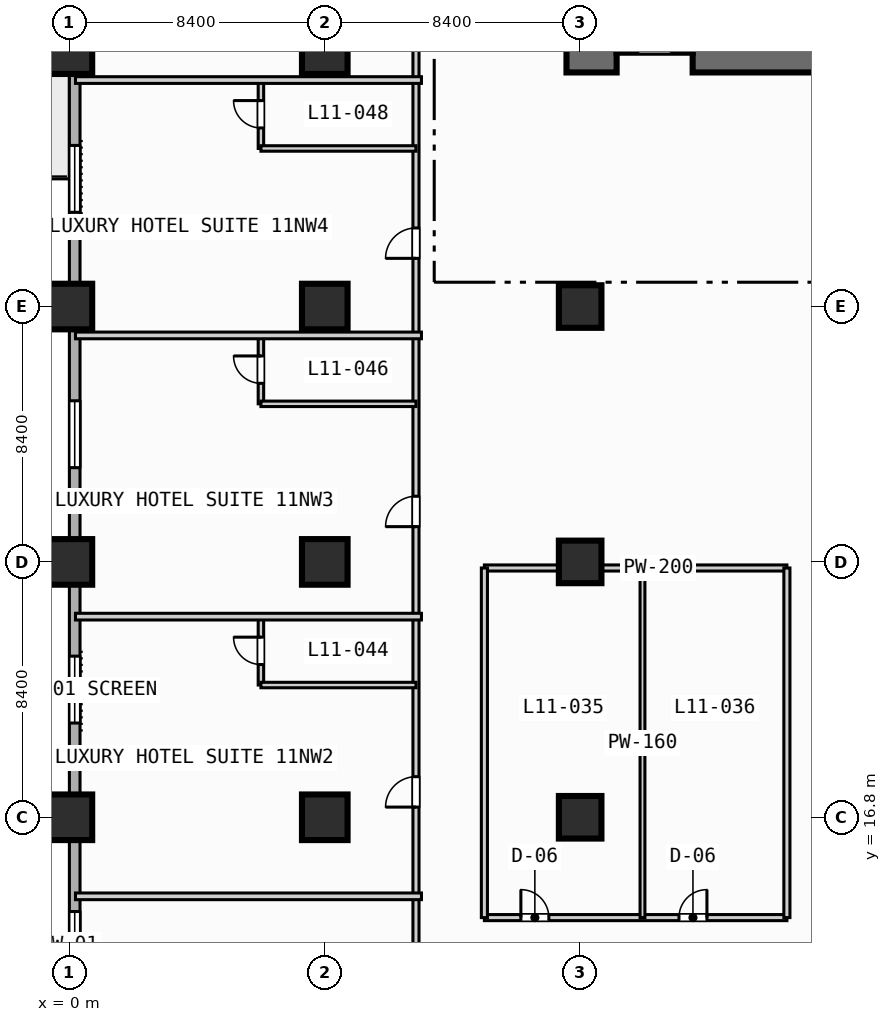
"""IFC4 building model, lengths in metres.
Left out: names, types, materials, properties, quantities, classifications, styles, units other than length and angle.
Written with IfcOpenShell. Run it as: python <this file> out.ifc"""

import sys

from ifc_helpers import new_model, si_unit, direction, frame, frame_2d, origin, origin_2d, place, context, subcontext, project, spatial, rectangle, extrude, element, fill, save


model = new_model("IFC4")
c1 = context("Model", 3, precision=1e-05, world=origin(), true_north=direction((0.0, 1.0)))
c2 = subcontext(c1, "Body", "Model", "MODEL_VIEW")
j1 = project(units=[si_unit("LENGTHUNIT", "METRE"), si_unit("PLANEANGLEUNIT", "RADIAN")], contexts=[c1])
p1 = place(None, origin())
s1 = spatial("IfcSite", under=j1, at=p1, CompositionType="ELEMENT")
p2 = place(p1, origin())
s2 = spatial("IfcBuilding", under=s1, at=p2, CompositionType="ELEMENT")
p3 = place(p2, frame((0.0, 0.0, 51.0)))
s3 = spatial("IfcBuildingStorey", under=s2, at=p3, CompositionType="ELEMENT", Elevation=51.0)
p4 = place(p3, frame((16.35, 41.75, 0.0), z_axis=(0.0, 0.0, 1.0), x_axis=(1.0, 0.0, 0.0)))
e1 = element("IfcWall", 1, at=p4, inside=s3, PredefinedType="SHEAR", context=c2, shape_type="SweptSolid", body=[
    extrude(rectangle(XDim=1.65, YDim=0.9, at=frame_2d((0.825, 0.0))), origin(), (0.0, 0.0, 1.0), 3.55),
])
p5 = place(p3, frame((20.5, 41.75, 0.0), z_axis=(0.0, 0.0, 1.0), x_axis=(1.0, 0.0, 0.0)))
e2 = element("IfcWall", 2, at=p5, inside=s3, PredefinedType="SHEAR", context=c2, shape_type="SweptSolid", body=[
    extrude(rectangle(XDim=5.15, YDim=0.9, at=frame_2d((2.575, 0.0))), origin(), (0.0, 0.0, 1.0), 3.55),
])
for number, where, z_axis, x_axis in (
    (3, (0.0, 16.8, 0.0), (0.0, 0.0, 1.0), (1.0, 0.0, 0.0)),
    (4, (0.0, 25.2, 0.0), (0.0, 0.0, 1.0), (1.0, 0.0, 0.0)),
    (5, (0.0, 33.6, 0.0), (0.0, 0.0, 1.0), (1.0, 0.0, 0.0)),
    (6, (0.0, 42.0, 0.0), (0.0, 0.0, 1.0), (1.0, 0.0, 0.0)),
    (7, (8.4, 16.8, 0.0), (0.0, 0.0, 1.0), (1.0, 0.0, 0.0)),
    (8, (8.4, 25.2, 0.0), (0.0, 0.0, 1.0), (1.0, 0.0, 0.0)),
    (9, (8.4, 33.6, 0.0), (0.0, 0.0, 1.0), (1.0, 0.0, 0.0)),
    (10, (8.4, 42.0, 0.0), (0.0, 0.0, 1.0), (1.0, 0.0, 0.0)),
):
    element("IfcColumn", number, at=place(p3, frame(where, z_axis=z_axis, x_axis=x_axis)), inside=s3, PredefinedType="COLUMN", context=c2, shape_type="SweptSolid", body=[
        extrude(rectangle(XDim=1.5, YDim=1.5, at=origin_2d()), origin(), (0.0, 0.0, 1.0), 3.8),
    ])
for number, where, z_axis, x_axis in (
    (11, (16.8, 16.8, 0.0), (0.0, 0.0, 1.0), (1.0, 0.0, 0.0)),
    (12, (16.8, 25.2, 0.0), (0.0, 0.0, 1.0), (1.0, 0.0, 0.0)),
    (13, (16.8, 33.6, 0.0), (0.0, 0.0, 1.0), (1.0, 0.0, 0.0)),
):
    element("IfcColumn", number, at=place(p3, frame(where, z_axis=z_axis, x_axis=x_axis)), inside=s3, PredefinedType="COLUMN", context=c2, shape_type="SweptSolid", body=[
        extrude(rectangle(XDim=1.4, YDim=1.4, at=origin_2d()), origin(), (0.0, 0.0, 1.0), 3.8),
    ])
p6 = place(p3, frame((0.175, 3.175, 0.0), z_axis=(0.0, 0.0, 1.0), x_axis=(0.0, 1.0, 0.0)))
e14 = element("IfcWall", 14, at=p6, inside=s3, PredefinedType="STANDARD", context=c2, shape_type="SweptSolid", body=[
    extrude(rectangle(XDim=86.05, YDim=0.35, at=frame_2d((43.025, 0.0))), origin(), (0.0, 0.0, 1.0), 3.55),
])
p7 = place(p6, frame((42.325, 0.0, 0.0)))
e15 = element("IfcOpeningElement", 15, at=p7, cuts=e14, PredefinedType="OPENING", context=c2, shape_type="SweptSolid", body=[
    extrude(rectangle(XDim=1.4, YDim=2.2, at=frame_2d((0.7, 1.1))), frame((0.0, 0.185, 0.0), z_axis=(0.0, -1.0, 0.0), x_axis=(1.0, 0.0, 0.0)), (0.0, 0.0, 1.0), 0.37),
])
p8 = place(p6, frame((8.325, 0.0, 0.85)))
e16 = element("IfcOpeningElement", 16, at=p8, cuts=e14, PredefinedType="OPENING", context=c2, shape_type="SweptSolid", body=[
    extrude(rectangle(XDim=2.2, YDim=1.8, at=frame_2d((1.1, 0.9))), frame((0.0, 0.185, 0.0), z_axis=(0.0, -1.0, 0.0), x_axis=(1.0, 0.0, 0.0)), (0.0, 0.0, 1.0), 0.37),
])
p9 = place(p6, frame((16.725, 0.0, 0.85)))
e17 = element("IfcOpeningElement", 17, at=p9, cuts=e14, PredefinedType="OPENING", context=c2, shape_type="SweptSolid", body=[
    extrude(rectangle(XDim=2.2, YDim=1.8, at=frame_2d((1.1, 0.9))), frame((0.0, 0.185, 0.0), z_axis=(0.0, -1.0, 0.0), x_axis=(1.0, 0.0, 0.0)), (0.0, 0.0, 1.0), 0.37),
])
p10 = place(p6, frame((25.125, 0.0, 0.85)))
e18 = element("IfcOpeningElement", 18, at=p10, cuts=e14, PredefinedType="OPENING", context=c2, shape_type="SweptSolid", body=[
    extrude(rectangle(XDim=2.2, YDim=1.8, at=frame_2d((1.1, 0.9))), frame((0.0, 0.185, 0.0), z_axis=(0.0, -1.0, 0.0), x_axis=(1.0, 0.0, 0.0)), (0.0, 0.0, 1.0), 0.37),
])
p11 = place(p6, frame((33.525, 0.0, 0.85)))
e19 = element("IfcOpeningElement", 19, at=p11, cuts=e14, PredefinedType="OPENING", context=c2, shape_type="SweptSolid", body=[
    extrude(rectangle(XDim=2.2, YDim=1.8, at=frame_2d((1.1, 0.9))), frame((0.0, 0.185, 0.0), z_axis=(0.0, -1.0, 0.0), x_axis=(1.0, 0.0, 0.0)), (0.0, 0.0, 1.0), 0.37),
])
p12 = place(p6, frame((56.675, 0.0, 0.85)))
e20 = element("IfcOpeningElement", 20, at=p12, cuts=e14, PredefinedType="OPENING", context=c2, shape_type="SweptSolid", body=[
    extrude(rectangle(XDim=1.8, YDim=1.8, at=frame_2d((0.9, 0.9))), frame((0.0, 0.185, 0.0), z_axis=(0.0, -1.0, 0.0), x_axis=(1.0, 0.0, 0.0)), (0.0, 0.0, 1.0), 0.37),
])
p13 = place(p3, frame((18.0, 42.075, 0.0), z_axis=(0.0, 0.0, 1.0), x_axis=(1.0, 0.0, 0.0)))
e21 = element("IfcWall", 21, at=p13, inside=s3, PredefinedType="SOLIDWALL", context=c2, shape_type="SweptSolid", body=[
    extrude(rectangle(XDim=2.5, YDim=0.25, at=frame_2d((1.25, 0.0))), origin(), (0.0, 0.0, 1.0), 3.55),
])
p14 = place(p13, frame((0.7, 0.0, 0.0)))
e22 = element("IfcOpeningElement", 22, at=p14, cuts=e21, PredefinedType="OPENING", context=c2, shape_type="SweptSolid", body=[
    extrude(rectangle(XDim=1.1, YDim=2.15, at=frame_2d((0.55, 1.075))), frame((0.0, 0.135, 0.0), z_axis=(0.0, -1.0, 0.0), x_axis=(1.0, 0.0, 0.0)), (0.0, 0.0, 1.0), 0.27),
])
p15 = place(p3, frame((13.65, 13.5, 0.0), z_axis=(0.0, 0.0, 1.0), x_axis=(1.0, 0.0, 0.0)))
e23 = element("IfcWall", 23, at=p15, inside=s3, PredefinedType="PARTITIONING", context=c2, shape_type="SweptSolid", body=[
    extrude(rectangle(XDim=9.95, YDim=0.2, at=frame_2d((4.975, 0.0))), origin(), (0.0, 0.0, 1.0), 3.55),
])
p16 = place(p15, frame((1.2, 0.0, 0.0)))
e24 = element("IfcOpeningElement", 24, at=p16, cuts=e23, PredefinedType="OPENING", context=c2, shape_type="SweptSolid", body=[
    extrude(rectangle(XDim=0.92, YDim=2.1, at=frame_2d((0.46, 1.05))), frame((0.0, 0.11, 0.0), z_axis=(0.0, -1.0, 0.0), x_axis=(1.0, 0.0, 0.0)), (0.0, 0.0, 1.0), 0.22),
])
p17 = place(p15, frame((6.4, 0.0, 0.0)))
e25 = element("IfcOpeningElement", 25, at=p17, cuts=e23, PredefinedType="OPENING", context=c2, shape_type="SweptSolid", body=[
    extrude(rectangle(XDim=0.92, YDim=2.1, at=frame_2d((0.46, 1.05))), frame((0.0, 0.11, 0.0), z_axis=(0.0, -1.0, 0.0), x_axis=(1.0, 0.0, 0.0)), (0.0, 0.0, 1.0), 0.22),
])
p18 = place(p3, frame((18.85, 13.5, 0.0), z_axis=(0.0, 0.0, 1.0), x_axis=(0.0, 1.0, 0.0)))
e26 = element("IfcWall", 26, at=p18, inside=s3, PredefinedType="PARTITIONING", context=c2, shape_type="SweptSolid", body=[
    extrude(rectangle(XDim=11.5, YDim=0.16, at=frame_2d((5.75, 0.0))), origin(), (0.0, 0.0, 1.0), 3.55),
])
p19 = place(p3, frame((13.65, 25.0, 0.0), z_axis=(0.0, 0.0, 1.0), x_axis=(1.0, 0.0, 0.0)))
e27 = element("IfcWall", 27, at=p19, inside=s3, PredefinedType="PARTITIONING", context=c2, shape_type="SweptSolid", body=[
    extrude(rectangle(XDim=9.95, YDim=0.2, at=frame_2d((4.975, 0.0))), origin(), (0.0, 0.0, 1.0), 2.8),
])
for number, where, z_axis, x_axis in (
    (28, (13.65, 13.5, 0.0), (0.0, 0.0, 1.0), (0.0, 1.0, 0.0)),
    (29, (23.6, 13.5, 0.0), (0.0, 0.0, 1.0), (0.0, 1.0, 0.0)),
):
    element("IfcWall", number, at=place(p3, frame(where, z_axis=z_axis, x_axis=x_axis)), inside=s3, PredefinedType="PARTITIONING", context=c2, shape_type="SweptSolid", body=[
        extrude(rectangle(XDim=11.5, YDim=0.2, at=frame_2d((5.75, 0.0))), origin(), (0.0, 0.0, 1.0), 3.55),
    ])
p20 = place(p3, frame((11.4, 3.4, 0.0), z_axis=(0.0, 0.0, 1.0), x_axis=(0.0, 1.0, 0.0)))
e30 = element("IfcWall", 30, at=p20, inside=s3, PredefinedType="PARTITIONING", context=c2, shape_type="SweptSolid", body=[
    extrude(rectangle(XDim=60.4, YDim=0.2, at=frame_2d((30.2, 0.0))), origin(), (0.0, 0.0, 1.0), 3.55),
])
p21 = place(p20, frame((6.065, 0.0, 0.0)))
e31 = element("IfcOpeningElement", 31, at=p21, cuts=e30, PredefinedType="OPENING", context=c2, shape_type="SweptSolid", body=[
    extrude(rectangle(XDim=1.0, YDim=2.15, at=frame_2d((0.5, 1.075))), frame((0.0, 0.11, 0.0), z_axis=(0.0, -1.0, 0.0), x_axis=(1.0, 0.0, 0.0)), (0.0, 0.0, 1.0), 0.22),
])
p22 = place(p20, frame((13.735, 0.0, 0.0)))
e32 = element("IfcOpeningElement", 32, at=p22, cuts=e30, PredefinedType="OPENING", context=c2, shape_type="SweptSolid", body=[
    extrude(rectangle(XDim=1.0, YDim=2.15, at=frame_2d((0.5, 1.075))), frame((0.0, 0.11, 0.0), z_axis=(0.0, -1.0, 0.0), x_axis=(1.0, 0.0, 0.0)), (0.0, 0.0, 1.0), 0.22),
])
p23 = place(p20, frame((22.96, 0.0, 0.0)))
e33 = element("IfcOpeningElement", 33, at=p23, cuts=e30, PredefinedType="OPENING", context=c2, shape_type="SweptSolid", body=[
    extrude(rectangle(XDim=1.0, YDim=2.15, at=frame_2d((0.5, 1.075))), frame((0.0, 0.11, 0.0), z_axis=(0.0, -1.0, 0.0), x_axis=(1.0, 0.0, 0.0)), (0.0, 0.0, 1.0), 0.22),
])
p24 = place(p20, frame((31.785, 0.0, 0.0)))
e34 = element("IfcOpeningElement", 34, at=p24, cuts=e30, PredefinedType="OPENING", context=c2, shape_type="SweptSolid", body=[
    extrude(rectangle(XDim=1.0, YDim=2.15, at=frame_2d((0.5, 1.075))), frame((0.0, 0.11, 0.0), z_axis=(0.0, -1.0, 0.0), x_axis=(1.0, 0.0, 0.0)), (0.0, 0.0, 1.0), 0.22),
])
p25 = place(p20, frame((42.56, 0.0, 0.0)))
e35 = element("IfcOpeningElement", 35, at=p25, cuts=e30, PredefinedType="OPENING", context=c2, shape_type="SweptSolid", body=[
    extrude(rectangle(XDim=1.0, YDim=2.15, at=frame_2d((0.5, 1.075))), frame((0.0, 0.11, 0.0), z_axis=(0.0, -1.0, 0.0), x_axis=(1.0, 0.0, 0.0)), (0.0, 0.0, 1.0), 0.22),
])
p26 = place(p20, frame((53.935, 0.0, 0.0)))
e36 = element("IfcOpeningElement", 36, at=p26, cuts=e30, PredefinedType="OPENING", context=c2, shape_type="SweptSolid", body=[
    extrude(rectangle(XDim=1.0, YDim=2.15, at=frame_2d((0.5, 1.075))), frame((0.0, 0.11, 0.0), z_axis=(0.0, -1.0, 0.0), x_axis=(1.0, 0.0, 0.0)), (0.0, 0.0, 1.0), 0.22),
])
p27 = place(p3, frame((0.2, 14.2, 0.0), z_axis=(0.0, 0.0, 1.0), x_axis=(1.0, 0.0, 0.0)))
e37 = element("IfcWall", 37, at=p27, inside=s3, PredefinedType="PARTITIONING", context=c2, shape_type="SweptSolid", body=[
    extrude(rectangle(XDim=11.38, YDim=0.22, at=frame_2d((5.69, 0.0))), origin(), (0.0, 0.0, 1.0), 3.55),
])
p28 = place(p3, frame((6.3, 21.15, 0.0), z_axis=(0.0, 0.0, 1.0), x_axis=(0.0, 1.0, 0.0)))
e38 = element("IfcWall", 38, at=p28, inside=s3, PredefinedType="PLUMBINGWALL", context=c2, shape_type="SweptSolid", body=[
    extrude(rectangle(XDim=2.25, YDim=0.18, at=frame_2d((1.125, 0.0))), origin(), (0.0, 0.0, 1.0), 3.55),
])
p29 = place(p28, frame((0.675, 0.0, 0.0)))
e39 = element("IfcOpeningElement", 39, at=p29, cuts=e38, PredefinedType="OPENING", context=c2, shape_type="SweptSolid", body=[
    extrude(rectangle(XDim=0.9, YDim=2.1, at=frame_2d((0.45, 1.05))), frame((0.0, 0.1, 0.0), z_axis=(0.0, -1.0, 0.0), x_axis=(1.0, 0.0, 0.0)), (0.0, 0.0, 1.0), 0.2),
])
p30 = place(p3, frame((6.3, 21.15, 0.0), z_axis=(0.0, 0.0, 1.0), x_axis=(1.0, 0.0, 0.0)))
e40 = element("IfcWall", 40, at=p30, inside=s3, PredefinedType="PLUMBINGWALL", context=c2, shape_type="SweptSolid", body=[
    extrude(rectangle(XDim=5.1, YDim=0.18, at=frame_2d((2.55, 0.0))), origin(), (0.0, 0.0, 1.0), 3.55),
])
p31 = place(p3, frame((0.2, 23.4, 0.0), z_axis=(0.0, 0.0, 1.0), x_axis=(1.0, 0.0, 0.0)))
e41 = element("IfcWall", 41, at=p31, inside=s3, PredefinedType="PARTITIONING", context=c2, shape_type="SweptSolid", body=[
    extrude(rectangle(XDim=11.38, YDim=0.22, at=frame_2d((5.69, 0.0))), origin(), (0.0, 0.0, 1.0), 3.55),
])
p32 = place(p3, frame((6.3, 30.4, 0.0), z_axis=(0.0, 0.0, 1.0), x_axis=(0.0, 1.0, 0.0)))
e42 = element("IfcWall", 42, at=p32, inside=s3, PredefinedType="PLUMBINGWALL", context=c2, shape_type="SweptSolid", body=[
    extrude(rectangle(XDim=2.25, YDim=0.18, at=frame_2d((1.125, 0.0))), origin(), (0.0, 0.0, 1.0), 3.55),
])
p33 = place(p32, frame((0.675, 0.0, 0.0)))
e43 = element("IfcOpeningElement", 43, at=p33, cuts=e42, PredefinedType="OPENING", context=c2, shape_type="SweptSolid", body=[
    extrude(rectangle(XDim=0.9, YDim=2.1, at=frame_2d((0.45, 1.05))), frame((0.0, 0.1, 0.0), z_axis=(0.0, -1.0, 0.0), x_axis=(1.0, 0.0, 0.0)), (0.0, 0.0, 1.0), 0.2),
])
p34 = place(p3, frame((6.3, 30.4, 0.0), z_axis=(0.0, 0.0, 1.0), x_axis=(1.0, 0.0, 0.0)))
e44 = element("IfcWall", 44, at=p34, inside=s3, PredefinedType="PLUMBINGWALL", context=c2, shape_type="SweptSolid", body=[
    extrude(rectangle(XDim=5.1, YDim=0.18, at=frame_2d((2.55, 0.0))), origin(), (0.0, 0.0, 1.0), 3.55),
])
p35 = place(p3, frame((0.2, 32.65, 0.0), z_axis=(0.0, 0.0, 1.0), x_axis=(1.0, 0.0, 0.0)))
e45 = element("IfcWall", 45, at=p35, inside=s3, PredefinedType="PARTITIONING", context=c2, shape_type="SweptSolid", body=[
    extrude(rectangle(XDim=11.38, YDim=0.22, at=frame_2d((5.69, 0.0))), origin(), (0.0, 0.0, 1.0), 3.55),
])
p36 = place(p3, frame((6.3, 38.8, 0.0), z_axis=(0.0, 0.0, 1.0), x_axis=(0.0, 1.0, 0.0)))
e46 = element("IfcWall", 46, at=p36, inside=s3, PredefinedType="PLUMBINGWALL", context=c2, shape_type="SweptSolid", body=[
    extrude(rectangle(XDim=2.25, YDim=0.18, at=frame_2d((1.125, 0.0))), origin(), (0.0, 0.0, 1.0), 3.55),
])
p37 = place(p36, frame((0.675, 0.0, 0.0)))
e47 = element("IfcOpeningElement", 47, at=p37, cuts=e46, PredefinedType="OPENING", context=c2, shape_type="SweptSolid", body=[
    extrude(rectangle(XDim=0.9, YDim=2.1, at=frame_2d((0.45, 1.05))), frame((0.0, 0.1, 0.0), z_axis=(0.0, -1.0, 0.0), x_axis=(1.0, 0.0, 0.0)), (0.0, 0.0, 1.0), 0.2),
])
p38 = place(p3, frame((6.3, 38.8, 0.0), z_axis=(0.0, 0.0, 1.0), x_axis=(1.0, 0.0, 0.0)))
e48 = element("IfcWall", 48, at=p38, inside=s3, PredefinedType="PLUMBINGWALL", context=c2, shape_type="SweptSolid", body=[
    extrude(rectangle(XDim=5.1, YDim=0.18, at=frame_2d((2.55, 0.0))), origin(), (0.0, 0.0, 1.0), 3.55),
])
p39 = place(p3, frame((0.2, 41.05, 0.0), z_axis=(0.0, 0.0, 1.0), x_axis=(1.0, 0.0, 0.0)))
e49 = element("IfcWall", 49, at=p39, inside=s3, PredefinedType="PARTITIONING", context=c2, shape_type="SweptSolid", body=[
    extrude(rectangle(XDim=11.38, YDim=0.22, at=frame_2d((5.69, 0.0))), origin(), (0.0, 0.0, 1.0), 3.55),
])
p40 = place(p8, origin())
e50 = element("IfcWindow", 50, at=p40, inside=s3, PartitioningType="SINGLE_PANEL", PredefinedType="WINDOW", context=c2, shape_type="SweptSolid", body=[
    extrude(rectangle(XDim=2.2, YDim=1.8, at=frame_2d((1.1, 0.9))), frame((0.0, 0.03, 0.0), z_axis=(0.0, -1.0, 0.0), x_axis=(1.0, 0.0, 0.0)), (0.0, 0.0, 1.0), 0.06),
])
fill(e16, e50)
p41 = place(p9, origin())
e51 = element("IfcWindow", 51, at=p41, inside=s3, PartitioningType="SINGLE_PANEL", PredefinedType="WINDOW", context=c2, shape_type="SweptSolid", body=[
    extrude(rectangle(XDim=2.2, YDim=1.8, at=frame_2d((1.1, 0.9))), frame((0.0, 0.03, 0.0), z_axis=(0.0, -1.0, 0.0), x_axis=(1.0, 0.0, 0.0)), (0.0, 0.0, 1.0), 0.06),
])
fill(e17, e51)
p42 = place(p10, origin())
e52 = element("IfcWindow", 52, at=p42, inside=s3, PartitioningType="SINGLE_PANEL", PredefinedType="WINDOW", context=c2, shape_type="SweptSolid", body=[
    extrude(rectangle(XDim=2.2, YDim=1.8, at=frame_2d((1.1, 0.9))), frame((0.0, 0.03, 0.0), z_axis=(0.0, -1.0, 0.0), x_axis=(1.0, 0.0, 0.0)), (0.0, 0.0, 1.0), 0.06),
])
fill(e18, e52)
p43 = place(p11, origin())
e53 = element("IfcWindow", 53, at=p43, inside=s3, PartitioningType="SINGLE_PANEL", PredefinedType="WINDOW", context=c2, shape_type="SweptSolid", body=[
    extrude(rectangle(XDim=2.2, YDim=1.8, at=frame_2d((1.1, 0.9))), frame((0.0, 0.03, 0.0), z_axis=(0.0, -1.0, 0.0), x_axis=(1.0, 0.0, 0.0)), (0.0, 0.0, 1.0), 0.06),
])
fill(e19, e53)
p44 = place(p16, origin())
e54 = element("IfcDoor", 54, at=p44, inside=s3, OperationType="SINGLE_SWING_LEFT", PredefinedType="DOOR", context=c2, shape_type="SweptSolid", body=[
    extrude(rectangle(XDim=0.92, YDim=2.1, at=frame_2d((0.46, 1.05))), frame((0.0, 0.025, 0.0), z_axis=(0.0, -1.0, 0.0), x_axis=(1.0, 0.0, 0.0)), (0.0, 0.0, 1.0), 0.05),
])
fill(e24, e54)
p45 = place(p17, origin())
e55 = element("IfcDoor", 55, at=p45, inside=s3, OperationType="SINGLE_SWING_RIGHT", PredefinedType="DOOR", context=c2, shape_type="SweptSolid", body=[
    extrude(rectangle(XDim=0.92, YDim=2.1, at=frame_2d((0.46, 1.05))), frame((0.0, 0.025, 0.0), z_axis=(0.0, -1.0, 0.0), x_axis=(1.0, 0.0, 0.0)), (0.0, 0.0, 1.0), 0.05),
])
fill(e25, e55)
p46 = place(p22, origin())
e56 = element("IfcDoor", 56, at=p46, inside=s3, OperationType="SINGLE_SWING_LEFT", PredefinedType="DOOR", context=c2, shape_type="SweptSolid", body=[
    extrude(rectangle(XDim=1.0, YDim=2.15, at=frame_2d((0.5, 1.075))), frame((0.0, 0.025, 0.0), z_axis=(0.0, -1.0, 0.0), x_axis=(1.0, 0.0, 0.0)), (0.0, 0.0, 1.0), 0.05),
])
fill(e32, e56)
p47 = place(p23, origin())
e57 = element("IfcDoor", 57, at=p47, inside=s3, OperationType="SINGLE_SWING_LEFT", PredefinedType="DOOR", context=c2, shape_type="SweptSolid", body=[
    extrude(rectangle(XDim=1.0, YDim=2.15, at=frame_2d((0.5, 1.075))), frame((0.0, 0.025, 0.0), z_axis=(0.0, -1.0, 0.0), x_axis=(1.0, 0.0, 0.0)), (0.0, 0.0, 1.0), 0.05),
])
fill(e33, e57)
p48 = place(p24, origin())
e58 = element("IfcDoor", 58, at=p48, inside=s3, OperationType="SINGLE_SWING_LEFT", PredefinedType="DOOR", context=c2, shape_type="SweptSolid", body=[
    extrude(rectangle(XDim=1.0, YDim=2.15, at=frame_2d((0.5, 1.075))), frame((0.0, 0.025, 0.0), z_axis=(0.0, -1.0, 0.0), x_axis=(1.0, 0.0, 0.0)), (0.0, 0.0, 1.0), 0.05),
])
fill(e34, e58)
p49 = place(p29, origin())
e59 = element("IfcDoor", 59, at=p49, inside=s3, OperationType="SINGLE_SWING_RIGHT", PredefinedType="DOOR", context=c2, shape_type="SweptSolid", body=[
    extrude(rectangle(XDim=0.9, YDim=2.1, at=frame_2d((0.45, 1.05))), frame((0.0, 0.025, 0.0), z_axis=(0.0, -1.0, 0.0), x_axis=(1.0, 0.0, 0.0)), (0.0, 0.0, 1.0), 0.05),
])
fill(e39, e59)
p50 = place(p33, origin())
e60 = element("IfcDoor", 60, at=p50, inside=s3, OperationType="SINGLE_SWING_RIGHT", PredefinedType="DOOR", context=c2, shape_type="SweptSolid", body=[
    extrude(rectangle(XDim=0.9, YDim=2.1, at=frame_2d((0.45, 1.05))), frame((0.0, 0.025, 0.0), z_axis=(0.0, -1.0, 0.0), x_axis=(1.0, 0.0, 0.0)), (0.0, 0.0, 1.0), 0.05),
])
fill(e43, e60)
p51 = place(p37, origin())
e61 = element("IfcDoor", 61, at=p51, inside=s3, OperationType="SINGLE_SWING_RIGHT", PredefinedType="DOOR", context=c2, shape_type="SweptSolid", body=[
    extrude(rectangle(XDim=0.9, YDim=2.1, at=frame_2d((0.45, 1.05))), frame((0.0, 0.025, 0.0), z_axis=(0.0, -1.0, 0.0), x_axis=(1.0, 0.0, 0.0)), (0.0, 0.0, 1.0), 0.05),
])
fill(e47, e61)
save(model, sys.argv[1])
